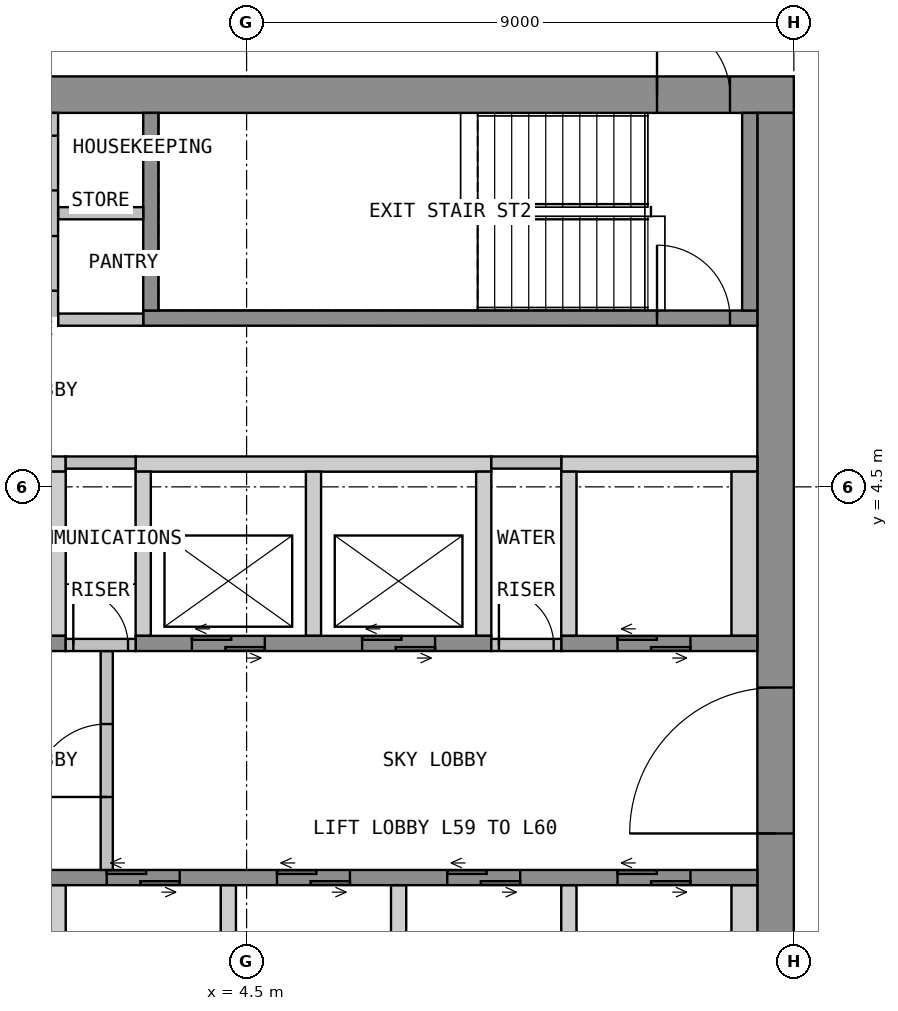
"""IFC4 building model, lengths in metres.
Left out: names, types, materials, properties, quantities, classifications, styles, units other than length and angle.
Written with IfcOpenShell. Run it as: python <this file> out.ifc"""

import sys

from ifc_helpers import new_model, si_unit, direction, frame, frame_2d, origin, place, context, subcontext, project, spatial, polyline, rectangle, outline, extrude, element, fill, save


model = new_model("IFC4")
c1 = context("Model", 3, precision=1e-05, world=origin(), true_north=direction((0.0, 1.0)))
c2 = subcontext(c1, "Body", "Model", "MODEL_VIEW")
j1 = project(units=[si_unit("LENGTHUNIT", "METRE"), si_unit("PLANEANGLEUNIT", "RADIAN")], contexts=[c1])
p1 = place(None, origin())
s1 = spatial("IfcSite", under=j1, at=p1, CompositionType="ELEMENT")
p2 = place(p1, origin())
s2 = spatial("IfcBuilding", under=s1, at=p2, CompositionType="ELEMENT")
p3 = place(p2, frame((0.0, 0.0, 235.2)))
s3 = spatial("IfcBuildingStorey", under=s2, at=p3, CompositionType="ELEMENT", Elevation=235.2)
p4 = place(p3, frame((-13.5, 10.95, 0.0), z_axis=(0.0, 0.0, 1.0), x_axis=(1.0, 0.0, 0.0)))
e1 = element("IfcWall", 1, at=p4, inside=s3, PredefinedType="SHEAR", context=c2, shape_type="SweptSolid", body=[
    extrude(rectangle(XDim=27.0, YDim=0.6, at=frame_2d((13.5, 0.0))), origin(), (0.0, 0.0, 1.0), 3.575),
])
p5 = place(p4, frame((12.3, 0.0, 0.0)))
e2 = element("IfcOpeningElement", 2, at=p5, cuts=e1, PredefinedType="OPENING", context=c2, shape_type="SweptSolid", body=[
    extrude(rectangle(XDim=2.4, YDim=2.1, at=frame_2d((1.2, 1.05))), frame((0.0, 0.31, 0.0), z_axis=(0.0, -1.0, 0.0), x_axis=(1.0, 0.0, 0.0)), (0.0, 0.0, 1.0), 0.62),
])
p6 = place(p4, frame((1.05, 0.0, 0.0)))
e3 = element("IfcOpeningElement", 3, at=p6, cuts=e1, PredefinedType="OPENING", context=c2, shape_type="SweptSolid", body=[
    extrude(rectangle(XDim=1.2, YDim=2.1, at=frame_2d((0.6, 1.05))), frame((0.0, 0.31, 0.0), z_axis=(0.0, -1.0, 0.0), x_axis=(1.0, 0.0, 0.0)), (0.0, 0.0, 1.0), 0.62),
])
p7 = place(p4, frame((24.75, 0.0, 0.0)))
e4 = element("IfcOpeningElement", 4, at=p7, cuts=e1, PredefinedType="OPENING", context=c2, shape_type="SweptSolid", body=[
    extrude(rectangle(XDim=1.2, YDim=2.1, at=frame_2d((0.6, 1.05))), frame((0.0, 0.31, 0.0), z_axis=(0.0, -1.0, 0.0), x_axis=(1.0, 0.0, 0.0)), (0.0, 0.0, 1.0), 0.62),
])
p8 = place(p3, frame((13.2, -10.65, 0.0), z_axis=(0.0, 0.0, 1.0), x_axis=(0.0, 1.0, 0.0)))
e5 = element("IfcWall", 5, at=p8, inside=s3, PredefinedType="SHEAR", context=c2, shape_type="SweptSolid", body=[
    extrude(rectangle(XDim=21.3, YDim=0.6, at=frame_2d((10.65, 0.0))), origin(), (0.0, 0.0, 1.0), 3.575),
])
p9 = place(p8, frame((9.45, 0.0, 0.0)))
e6 = element("IfcOpeningElement", 6, at=p9, cuts=e5, PredefinedType="OPENING", context=c2, shape_type="SweptSolid", body=[
    extrude(rectangle(XDim=2.4, YDim=2.1, at=frame_2d((1.2, 1.05))), frame((0.0, 0.31, 0.0), z_axis=(0.0, -1.0, 0.0), x_axis=(1.0, 0.0, 0.0)), (0.0, 0.0, 1.0), 0.62),
])
p10 = place(p3, origin())
e7 = element("IfcWall", 7, at=p10, inside=s3, PredefinedType="SHEAR", context=c2, shape_type="SweptSolid", body=[
    extrude(outline(polyline([(-1.525, 4.75), (1.525, 4.75), (1.525, 5.0), (-1.525, 5.0), (-1.525, 4.75)])), origin(), (0.0, 0.0, 1.0), 3.575),
])
p11 = place(p3, origin())
e8 = element("IfcWall", 8, at=p11, inside=s3, PredefinedType="SHEAR", context=c2, shape_type="SweptSolid", body=[
    extrude(outline(polyline([(2.675, 4.75), (8.525, 4.75), (8.525, 5.0), (2.675, 5.0), (2.675, 4.75)])), origin(), (0.0, 0.0, 1.0), 3.575),
])
p12 = place(p3, origin())
e9 = element("IfcWall", 9, at=p12, inside=s3, PredefinedType="SHEAR", context=c2, shape_type="SweptSolid", body=[
    extrude(outline(polyline([(9.675, 4.75), (12.9, 4.75), (12.9, 5.0), (9.675, 5.0), (9.675, 4.75)])), origin(), (0.0, 0.0, 1.0), 3.575),
])
p13 = place(p3, origin())
e10 = element("IfcWall", 10, at=p13, inside=s3, PredefinedType="SHEAR", context=c2, shape_type="SweptSolid", body=[
    extrude(outline(polyline([(1.275, 2.05), (1.525, 2.05), (1.525, 4.75), (1.275, 4.75), (1.275, 2.05)])), origin(), (0.0, 0.0, 1.0), 3.575),
])
p14 = place(p3, origin())
e11 = element("IfcWall", 11, at=p14, inside=s3, PredefinedType="SHEAR", context=c2, shape_type="SweptSolid", body=[
    extrude(outline(polyline([(2.675, 2.05), (2.925, 2.05), (2.925, 4.75), (2.675, 4.75), (2.675, 2.05)])), origin(), (0.0, 0.0, 1.0), 3.575),
])
p15 = place(p3, origin())
e12 = element("IfcWall", 12, at=p15, inside=s3, PredefinedType="SHEAR", context=c2, shape_type="SweptSolid", body=[
    extrude(outline(polyline([(5.475, 2.05), (5.725, 2.05), (5.725, 4.75), (5.475, 4.75), (5.475, 2.05)])), origin(), (0.0, 0.0, 1.0), 3.575),
])
p16 = place(p3, origin())
e13 = element("IfcWall", 13, at=p16, inside=s3, PredefinedType="SHEAR", context=c2, shape_type="SweptSolid", body=[
    extrude(outline(polyline([(8.275, 2.05), (8.525, 2.05), (8.525, 4.75), (8.275, 4.75), (8.275, 2.05)])), origin(), (0.0, 0.0, 1.0), 3.575),
])
p17 = place(p3, origin())
e14 = element("IfcWall", 14, at=p17, inside=s3, PredefinedType="SHEAR", context=c2, shape_type="SweptSolid", body=[
    extrude(outline(polyline([(9.675, 2.05), (9.925, 2.05), (9.925, 4.75), (9.675, 4.75), (9.675, 2.05)])), origin(), (0.0, 0.0, 1.0), 3.575),
])
p18 = place(p3, origin())
e15 = element("IfcWall", 15, at=p18, inside=s3, PredefinedType="SHEAR", context=c2, shape_type="SweptSolid", body=[
    extrude(outline(polyline([(12.475, 2.05), (12.9, 2.05), (12.9, 4.75), (12.475, 4.75), (12.475, 2.05)])), origin(), (0.0, 0.0, 1.0), 3.575),
])
p19 = place(p3, frame((-1.525, 1.925, 0.0), z_axis=(0.0, 0.0, 1.0), x_axis=(1.0, 0.0, 0.0)))
e16 = element("IfcWall", 16, at=p19, inside=s3, PredefinedType="SHEAR", context=c2, shape_type="SweptSolid", body=[
    extrude(rectangle(XDim=3.05, YDim=0.25, at=frame_2d((1.525, 0.0))), origin(), (0.0, 0.0, 1.0), 3.575),
])
p20 = place(p19, frame((0.925, 0.0, 0.0)))
e17 = element("IfcOpeningElement", 17, at=p20, cuts=e16, PredefinedType="OPENING", context=c2, shape_type="SweptSolid", body=[
    extrude(rectangle(XDim=1.2, YDim=2.1, at=frame_2d((0.6, 1.05))), frame((0.0, 0.135, 0.0), z_axis=(0.0, -1.0, 0.0), x_axis=(1.0, 0.0, 0.0)), (0.0, 0.0, 1.0), 0.27),
])
p21 = place(p3, frame((2.675, 1.925, 0.0), z_axis=(0.0, 0.0, 1.0), x_axis=(1.0, 0.0, 0.0)))
e18 = element("IfcWall", 18, at=p21, inside=s3, PredefinedType="SHEAR", context=c2, shape_type="SweptSolid", body=[
    extrude(rectangle(XDim=5.85, YDim=0.25, at=frame_2d((2.925, 0.0))), origin(), (0.0, 0.0, 1.0), 3.575),
])
p22 = place(p21, frame((0.925, 0.0, 0.0)))
e19 = element("IfcOpeningElement", 19, at=p22, cuts=e18, PredefinedType="OPENING", context=c2, shape_type="SweptSolid", body=[
    extrude(rectangle(XDim=1.2, YDim=2.1, at=frame_2d((0.6, 1.05))), frame((0.0, 0.135, 0.0), z_axis=(0.0, -1.0, 0.0), x_axis=(1.0, 0.0, 0.0)), (0.0, 0.0, 1.0), 0.27),
])
p23 = place(p21, frame((3.725, 0.0, 0.0)))
e20 = element("IfcOpeningElement", 20, at=p23, cuts=e18, PredefinedType="OPENING", context=c2, shape_type="SweptSolid", body=[
    extrude(rectangle(XDim=1.2, YDim=2.1, at=frame_2d((0.6, 1.05))), frame((0.0, 0.135, 0.0), z_axis=(0.0, -1.0, 0.0), x_axis=(1.0, 0.0, 0.0)), (0.0, 0.0, 1.0), 0.27),
])
p24 = place(p3, frame((9.675, 1.925, 0.0), z_axis=(0.0, 0.0, 1.0), x_axis=(1.0, 0.0, 0.0)))
e21 = element("IfcWall", 21, at=p24, inside=s3, PredefinedType="SHEAR", context=c2, shape_type="SweptSolid", body=[
    extrude(rectangle(XDim=3.225, YDim=0.25, at=frame_2d((1.612, 0.0))), origin(), (0.0, 0.0, 1.0), 3.575),
])
p25 = place(p24, frame((0.925, 0.0, 0.0)))
e22 = element("IfcOpeningElement", 22, at=p25, cuts=e21, PredefinedType="OPENING", context=c2, shape_type="SweptSolid", body=[
    extrude(rectangle(XDim=1.2, YDim=2.1, at=frame_2d((0.6, 1.05))), frame((0.0, 0.135, 0.0), z_axis=(0.0, -1.0, 0.0), x_axis=(1.0, 0.0, 0.0)), (0.0, 0.0, 1.0), 0.27),
])
p26 = place(p3, origin())
e23 = element("IfcWall", 23, at=p26, inside=s3, PredefinedType="SHEAR", context=c2, shape_type="SweptSolid", body=[
    extrude(outline(polyline([(1.275, -4.75), (1.525, -4.75), (1.525, -2.05), (1.275, -2.05), (1.275, -4.75)])), origin(), (0.0, 0.0, 1.0), 3.575),
])
p27 = place(p3, origin())
e24 = element("IfcWall", 24, at=p27, inside=s3, PredefinedType="SHEAR", context=c2, shape_type="SweptSolid", body=[
    extrude(outline(polyline([(4.075, -4.75), (4.325, -4.75), (4.325, -2.05), (4.075, -2.05), (4.075, -4.75)])), origin(), (0.0, 0.0, 1.0), 3.575),
])
p28 = place(p3, origin())
e25 = element("IfcWall", 25, at=p28, inside=s3, PredefinedType="SHEAR", context=c2, shape_type="SweptSolid", body=[
    extrude(outline(polyline([(6.875, -4.75), (7.125, -4.75), (7.125, -2.05), (6.875, -2.05), (6.875, -4.75)])), origin(), (0.0, 0.0, 1.0), 3.575),
])
p29 = place(p3, origin())
e26 = element("IfcWall", 26, at=p29, inside=s3, PredefinedType="SHEAR", context=c2, shape_type="SweptSolid", body=[
    extrude(outline(polyline([(9.675, -4.75), (9.925, -4.75), (9.925, -2.05), (9.675, -2.05), (9.675, -4.75)])), origin(), (0.0, 0.0, 1.0), 3.575),
])
p30 = place(p3, origin())
e27 = element("IfcWall", 27, at=p30, inside=s3, PredefinedType="SHEAR", context=c2, shape_type="SweptSolid", body=[
    extrude(outline(polyline([(12.475, -4.75), (12.9, -4.75), (12.9, -2.05), (12.475, -2.05), (12.475, -4.75)])), origin(), (0.0, 0.0, 1.0), 3.575),
])
p31 = place(p3, frame((-1.525, -1.925, 0.0), z_axis=(0.0, 0.0, 1.0), x_axis=(1.0, 0.0, 0.0)))
e28 = element("IfcWall", 28, at=p31, inside=s3, PredefinedType="SHEAR", context=c2, shape_type="SweptSolid", body=[
    extrude(rectangle(XDim=14.425, YDim=0.25, at=frame_2d((7.212, 0.0))), origin(), (0.0, 0.0, 1.0), 3.575),
])
p32 = place(p31, frame((0.925, 0.0, 0.0)))
e29 = element("IfcOpeningElement", 29, at=p32, cuts=e28, PredefinedType="OPENING", context=c2, shape_type="SweptSolid", body=[
    extrude(rectangle(XDim=1.2, YDim=2.1, at=frame_2d((0.6, 1.05))), frame((0.0, 0.135, 0.0), z_axis=(0.0, -1.0, 0.0), x_axis=(1.0, 0.0, 0.0)), (0.0, 0.0, 1.0), 0.27),
])
p33 = place(p31, frame((3.725, 0.0, 0.0)))
e30 = element("IfcOpeningElement", 30, at=p33, cuts=e28, PredefinedType="OPENING", context=c2, shape_type="SweptSolid", body=[
    extrude(rectangle(XDim=1.2, YDim=2.1, at=frame_2d((0.6, 1.05))), frame((0.0, 0.135, 0.0), z_axis=(0.0, -1.0, 0.0), x_axis=(1.0, 0.0, 0.0)), (0.0, 0.0, 1.0), 0.27),
])
p34 = place(p31, frame((6.525, 0.0, 0.0)))
e31 = element("IfcOpeningElement", 31, at=p34, cuts=e28, PredefinedType="OPENING", context=c2, shape_type="SweptSolid", body=[
    extrude(rectangle(XDim=1.2, YDim=2.1, at=frame_2d((0.6, 1.05))), frame((0.0, 0.135, 0.0), z_axis=(0.0, -1.0, 0.0), x_axis=(1.0, 0.0, 0.0)), (0.0, 0.0, 1.0), 0.27),
])
p35 = place(p31, frame((9.325, 0.0, 0.0)))
e32 = element("IfcOpeningElement", 32, at=p35, cuts=e28, PredefinedType="OPENING", context=c2, shape_type="SweptSolid", body=[
    extrude(rectangle(XDim=1.2, YDim=2.1, at=frame_2d((0.6, 1.05))), frame((0.0, 0.135, 0.0), z_axis=(0.0, -1.0, 0.0), x_axis=(1.0, 0.0, 0.0)), (0.0, 0.0, 1.0), 0.27),
])
p36 = place(p31, frame((12.125, 0.0, 0.0)))
e33 = element("IfcOpeningElement", 33, at=p36, cuts=e28, PredefinedType="OPENING", context=c2, shape_type="SweptSolid", body=[
    extrude(rectangle(XDim=1.2, YDim=2.1, at=frame_2d((0.6, 1.05))), frame((0.0, 0.135, 0.0), z_axis=(0.0, -1.0, 0.0), x_axis=(1.0, 0.0, 0.0)), (0.0, 0.0, 1.0), 0.27),
])
p37 = place(p3, frame((2.2, -1.8, 0.0), z_axis=(0.0, 0.0, 1.0), x_axis=(0.0, 1.0, 0.0)))
e34 = element("IfcWall", 34, at=p37, inside=s3, PredefinedType="PARTITIONING", context=c2, shape_type="SweptSolid", body=[
    extrude(rectangle(XDim=3.6, YDim=0.2, at=frame_2d((1.8, 0.0))), origin(), (0.0, 0.0, 1.0), 3.575),
])
p38 = place(p37, frame((1.2, 0.0, 0.0)))
e35 = element("IfcOpeningElement", 35, at=p38, cuts=e34, PredefinedType="OPENING", context=c2, shape_type="SweptSolid", body=[
    extrude(rectangle(XDim=1.2, YDim=2.1, at=frame_2d((0.6, 1.05))), frame((0.0, 0.11, 0.0), z_axis=(0.0, -1.0, 0.0), x_axis=(1.0, 0.0, 0.0)), (0.0, 0.0, 1.0), 0.22),
])
p39 = place(p3, frame((2.8, 7.275, 0.0), z_axis=(0.0, 0.0, 1.0), x_axis=(1.0, 0.0, 0.0)))
e36 = element("IfcWall", 36, at=p39, inside=s3, PredefinedType="SHEAR", context=c2, shape_type="SweptSolid", body=[
    extrude(rectangle(XDim=10.1, YDim=0.25, at=frame_2d((5.05, 0.0))), origin(), (0.0, 0.0, 1.0), 3.575),
])
p40 = place(p39, frame((8.45, 0.0, 0.0)))
e37 = element("IfcOpeningElement", 37, at=p40, cuts=e36, PredefinedType="OPENING", context=c2, shape_type="SweptSolid", body=[
    extrude(rectangle(XDim=1.2, YDim=2.1, at=frame_2d((0.6, 1.05))), frame((0.0, 0.135, 0.0), z_axis=(0.0, -1.0, 0.0), x_axis=(1.0, 0.0, 0.0)), (0.0, 0.0, 1.0), 0.27),
])
for number, where, z_axis, x_axis in (
    (38, (2.925, 7.4, 0.0), (0.0, 0.0, 1.0), (0.0, 1.0, 0.0)),
    (39, (12.775, 7.4, 0.0), (0.0, 0.0, 1.0), (0.0, 1.0, 0.0)),
):
    element("IfcWall", number, at=place(p3, frame(where, z_axis=z_axis, x_axis=x_axis)), inside=s3, PredefinedType="SHEAR", context=c2, shape_type="SweptSolid", body=[
        extrude(rectangle(XDim=3.25, YDim=0.25, at=frame_2d((1.625, 0.0))), origin(), (0.0, 0.0, 1.0), 3.575),
    ])
for number, where, z_axis, x_axis in (
    (40, (1.4, 7.25, 0.0), (0.0, 0.0, 1.0), (1.0, 0.0, 0.0)),
    (41, (1.4, 9.0, 0.0), (0.0, 0.0, 1.0), (1.0, 0.0, 0.0)),
):
    element("IfcWall", number, at=place(p3, frame(where, z_axis=z_axis, x_axis=x_axis)), inside=s3, PredefinedType="PARTITIONING", context=c2, shape_type="SweptSolid", body=[
        extrude(rectangle(XDim=1.4, YDim=0.2, at=frame_2d((0.7, 0.0))), origin(), (0.0, 0.0, 1.0), 3.575),
    ])
p41 = place(p3, frame((1.3, 7.15, 0.0), z_axis=(0.0, 0.0, 1.0), x_axis=(0.0, 1.0, 0.0)))
e42 = element("IfcWall", 42, at=p41, inside=s3, PredefinedType="PARTITIONING", context=c2, shape_type="SweptSolid", body=[
    extrude(rectangle(XDim=3.5, YDim=0.2, at=frame_2d((1.75, 0.0))), origin(), (0.0, 0.0, 1.0), 3.575),
])
p42 = place(p41, frame((0.575, 0.0, 0.0)))
e43 = element("IfcOpeningElement", 43, at=p42, cuts=e42, PredefinedType="OPENING", context=c2, shape_type="SweptSolid", body=[
    extrude(rectangle(XDim=0.9, YDim=2.1, at=frame_2d((0.45, 1.05))), frame((0.0, 0.11, 0.0), z_axis=(0.0, -1.0, 0.0), x_axis=(1.0, 0.0, 0.0)), (0.0, 0.0, 1.0), 0.22),
])
p43 = place(p41, frame((2.225, 0.0, 0.0)))
e44 = element("IfcOpeningElement", 44, at=p43, cuts=e42, PredefinedType="OPENING", context=c2, shape_type="SweptSolid", body=[
    extrude(rectangle(XDim=0.9, YDim=2.1, at=frame_2d((0.45, 1.05))), frame((0.0, 0.11, 0.0), z_axis=(0.0, -1.0, 0.0), x_axis=(1.0, 0.0, 0.0)), (0.0, 0.0, 1.0), 0.22),
])
p44 = place(p3, frame((1.525, 1.9, 0.0), z_axis=(0.0, 0.0, 1.0), x_axis=(1.0, 0.0, 0.0)))
e45 = element("IfcWall", 45, at=p44, inside=s3, PredefinedType="PARTITIONING", context=c2, shape_type="SweptSolid", body=[
    extrude(rectangle(XDim=1.15, YDim=0.2, at=frame_2d((0.575, 0.0))), origin(), (0.0, 0.0, 1.0), 3.575),
])
p45 = place(p44, frame((0.125, 0.0, 0.0)))
e46 = element("IfcOpeningElement", 46, at=p45, cuts=e45, PredefinedType="OPENING", context=c2, shape_type="SweptSolid", body=[
    extrude(rectangle(XDim=0.9, YDim=2.1, at=frame_2d((0.45, 1.05))), frame((0.0, 0.11, 0.0), z_axis=(0.0, -1.0, 0.0), x_axis=(1.0, 0.0, 0.0)), (0.0, 0.0, 1.0), 0.22),
])
p46 = place(p3, frame((1.525, 4.9, 0.0), z_axis=(0.0, 0.0, 1.0), x_axis=(1.0, 0.0, 0.0)))
e47 = element("IfcWall", 47, at=p46, inside=s3, PredefinedType="PARTITIONING", context=c2, shape_type="SweptSolid", body=[
    extrude(rectangle(XDim=1.15, YDim=0.2, at=frame_2d((0.575, 0.0))), origin(), (0.0, 0.0, 1.0), 3.575),
])
p47 = place(p3, frame((8.525, 1.9, 0.0), z_axis=(0.0, 0.0, 1.0), x_axis=(1.0, 0.0, 0.0)))
e48 = element("IfcWall", 48, at=p47, inside=s3, PredefinedType="PARTITIONING", context=c2, shape_type="SweptSolid", body=[
    extrude(rectangle(XDim=1.15, YDim=0.2, at=frame_2d((0.575, 0.0))), origin(), (0.0, 0.0, 1.0), 3.575),
])
p48 = place(p47, frame((0.125, 0.0, 0.0)))
e49 = element("IfcOpeningElement", 49, at=p48, cuts=e48, PredefinedType="OPENING", context=c2, shape_type="SweptSolid", body=[
    extrude(rectangle(XDim=0.9, YDim=2.1, at=frame_2d((0.45, 1.05))), frame((0.0, 0.11, 0.0), z_axis=(0.0, -1.0, 0.0), x_axis=(1.0, 0.0, 0.0)), (0.0, 0.0, 1.0), 0.22),
])
p49 = place(p3, frame((8.525, 4.9, 0.0), z_axis=(0.0, 0.0, 1.0), x_axis=(1.0, 0.0, 0.0)))
e50 = element("IfcWall", 50, at=p49, inside=s3, PredefinedType="PARTITIONING", context=c2, shape_type="SweptSolid", body=[
    extrude(rectangle(XDim=1.15, YDim=0.2, at=frame_2d((0.575, 0.0))), origin(), (0.0, 0.0, 1.0), 3.575),
])
p50 = place(p9, origin())
e51 = element("IfcDoor", 51, at=p50, inside=s3, OperationType="DOUBLE_DOOR_DOUBLE_SWING", PredefinedType="DOOR", context=c2, shape_type="SweptSolid", body=[
    extrude(rectangle(XDim=2.4, YDim=2.1, at=frame_2d((1.2, 1.05))), frame((0.0, 0.025, 0.0), z_axis=(0.0, -1.0, 0.0), x_axis=(1.0, 0.0, 0.0)), (0.0, 0.0, 1.0), 0.05),
])
fill(e6, e51)
p51 = place(p7, origin())
e52 = element("IfcDoor", 52, at=p51, inside=s3, OperationType="SINGLE_SWING_RIGHT", PredefinedType="DOOR", context=c2, shape_type="SweptSolid", body=[
    extrude(rectangle(XDim=1.2, YDim=2.1, at=frame_2d((0.6, 1.05))), frame((0.0, 0.025, 0.0), z_axis=(0.0, -1.0, 0.0), x_axis=(1.0, 0.0, 0.0)), (0.0, 0.0, 1.0), 0.05),
])
fill(e4, e52)
p52 = place(p22, origin())
e53 = element("IfcDoor", 53, at=p52, inside=s3, OperationType="DOUBLE_DOOR_SLIDING", PredefinedType="DOOR", context=c2, shape_type="SweptSolid", body=[
    extrude(rectangle(XDim=1.2, YDim=2.1, at=frame_2d((0.6, 1.05))), frame((0.0, 0.025, 0.0), z_axis=(0.0, -1.0, 0.0), x_axis=(1.0, 0.0, 0.0)), (0.0, 0.0, 1.0), 0.05),
])
fill(e19, e53)
p53 = place(p23, origin())
e54 = element("IfcDoor", 54, at=p53, inside=s3, OperationType="DOUBLE_DOOR_SLIDING", PredefinedType="DOOR", context=c2, shape_type="SweptSolid", body=[
    extrude(rectangle(XDim=1.2, YDim=2.1, at=frame_2d((0.6, 1.05))), frame((0.0, 0.025, 0.0), z_axis=(0.0, -1.0, 0.0), x_axis=(1.0, 0.0, 0.0)), (0.0, 0.0, 1.0), 0.05),
])
fill(e20, e54)
p54 = place(p25, origin())
e55 = element("IfcDoor", 55, at=p54, inside=s3, OperationType="DOUBLE_DOOR_SLIDING", PredefinedType="DOOR", context=c2, shape_type="SweptSolid", body=[
    extrude(rectangle(XDim=1.2, YDim=2.1, at=frame_2d((0.6, 1.05))), frame((0.0, 0.025, 0.0), z_axis=(0.0, -1.0, 0.0), x_axis=(1.0, 0.0, 0.0)), (0.0, 0.0, 1.0), 0.05),
])
fill(e22, e55)
p55 = place(p33, origin())
e56 = element("IfcDoor", 56, at=p55, inside=s3, OperationType="DOUBLE_DOOR_SLIDING", PredefinedType="DOOR", context=c2, shape_type="SweptSolid", body=[
    extrude(rectangle(XDim=1.2, YDim=2.1, at=frame_2d((0.6, 1.05))), frame((0.0, 0.025, 0.0), z_axis=(0.0, -1.0, 0.0), x_axis=(1.0, 0.0, 0.0)), (0.0, 0.0, 1.0), 0.05),
])
fill(e30, e56)
p56 = place(p34, origin())
e57 = element("IfcDoor", 57, at=p56, inside=s3, OperationType="DOUBLE_DOOR_SLIDING", PredefinedType="DOOR", context=c2, shape_type="SweptSolid", body=[
    extrude(rectangle(XDim=1.2, YDim=2.1, at=frame_2d((0.6, 1.05))), frame((0.0, 0.025, 0.0), z_axis=(0.0, -1.0, 0.0), x_axis=(1.0, 0.0, 0.0)), (0.0, 0.0, 1.0), 0.05),
])
fill(e31, e57)
p57 = place(p35, origin())
e58 = element("IfcDoor", 58, at=p57, inside=s3, OperationType="DOUBLE_DOOR_SLIDING", PredefinedType="DOOR", context=c2, shape_type="SweptSolid", body=[
    extrude(rectangle(XDim=1.2, YDim=2.1, at=frame_2d((0.6, 1.05))), frame((0.0, 0.025, 0.0), z_axis=(0.0, -1.0, 0.0), x_axis=(1.0, 0.0, 0.0)), (0.0, 0.0, 1.0), 0.05),
])
fill(e32, e58)
p58 = place(p36, origin())
e59 = element("IfcDoor", 59, at=p58, inside=s3, OperationType="DOUBLE_DOOR_SLIDING", PredefinedType="DOOR", context=c2, shape_type="SweptSolid", body=[
    extrude(rectangle(XDim=1.2, YDim=2.1, at=frame_2d((0.6, 1.05))), frame((0.0, 0.025, 0.0), z_axis=(0.0, -1.0, 0.0), x_axis=(1.0, 0.0, 0.0)), (0.0, 0.0, 1.0), 0.05),
])
fill(e33, e59)
p59 = place(p38, origin())
e60 = element("IfcDoor", 60, at=p59, inside=s3, OperationType="SINGLE_SWING_LEFT", PredefinedType="DOOR", context=c2, shape_type="SweptSolid", body=[
    extrude(rectangle(XDim=1.2, YDim=2.1, at=frame_2d((0.6, 1.05))), frame((0.0, 0.025, 0.0), z_axis=(0.0, -1.0, 0.0), x_axis=(1.0, 0.0, 0.0)), (0.0, 0.0, 1.0), 0.05),
])
fill(e35, e60)
p60 = place(p40, origin())
e61 = element("IfcDoor", 61, at=p60, inside=s3, OperationType="SINGLE_SWING_LEFT", PredefinedType="DOOR", context=c2, shape_type="SweptSolid", body=[
    extrude(rectangle(XDim=1.2, YDim=2.1, at=frame_2d((0.6, 1.05))), frame((0.0, 0.025, 0.0), z_axis=(0.0, -1.0, 0.0), x_axis=(1.0, 0.0, 0.0)), (0.0, 0.0, 1.0), 0.05),
])
fill(e37, e61)
p61 = place(p42, origin())
e62 = element("IfcDoor", 62, at=p61, inside=s3, OperationType="SINGLE_SWING_LEFT", PredefinedType="DOOR", context=c2, shape_type="SweptSolid", body=[
    extrude(rectangle(XDim=0.9, YDim=2.1, at=frame_2d((0.45, 1.05))), frame((0.0, 0.025, 0.0), z_axis=(0.0, -1.0, 0.0), x_axis=(1.0, 0.0, 0.0)), (0.0, 0.0, 1.0), 0.05),
])
fill(e43, e62)
p62 = place(p43, origin())
e63 = element("IfcDoor", 63, at=p62, inside=s3, OperationType="SINGLE_SWING_LEFT", PredefinedType="DOOR", context=c2, shape_type="SweptSolid", body=[
    extrude(rectangle(XDim=0.9, YDim=2.1, at=frame_2d((0.45, 1.05))), frame((0.0, 0.025, 0.0), z_axis=(0.0, -1.0, 0.0), x_axis=(1.0, 0.0, 0.0)), (0.0, 0.0, 1.0), 0.05),
])
fill(e44, e63)
p63 = place(p45, origin())
e64 = element("IfcDoor", 64, at=p63, inside=s3, OperationType="SINGLE_SWING_LEFT", PredefinedType="DOOR", context=c2, shape_type="SweptSolid", body=[
    extrude(rectangle(XDim=0.9, YDim=2.1, at=frame_2d((0.45, 1.05))), frame((0.0, 0.025, 0.0), z_axis=(0.0, -1.0, 0.0), x_axis=(1.0, 0.0, 0.0)), (0.0, 0.0, 1.0), 0.05),
])
fill(e46, e64)
p64 = place(p48, origin())
e65 = element("IfcDoor", 65, at=p64, inside=s3, OperationType="SINGLE_SWING_LEFT", PredefinedType="DOOR", context=c2, shape_type="SweptSolid", body=[
    extrude(rectangle(XDim=0.9, YDim=2.1, at=frame_2d((0.45, 1.05))), frame((0.0, 0.025, 0.0), z_axis=(0.0, -1.0, 0.0), x_axis=(1.0, 0.0, 0.0)), (0.0, 0.0, 1.0), 0.05),
])
fill(e49, e65)
save(model, sys.argv[1])
